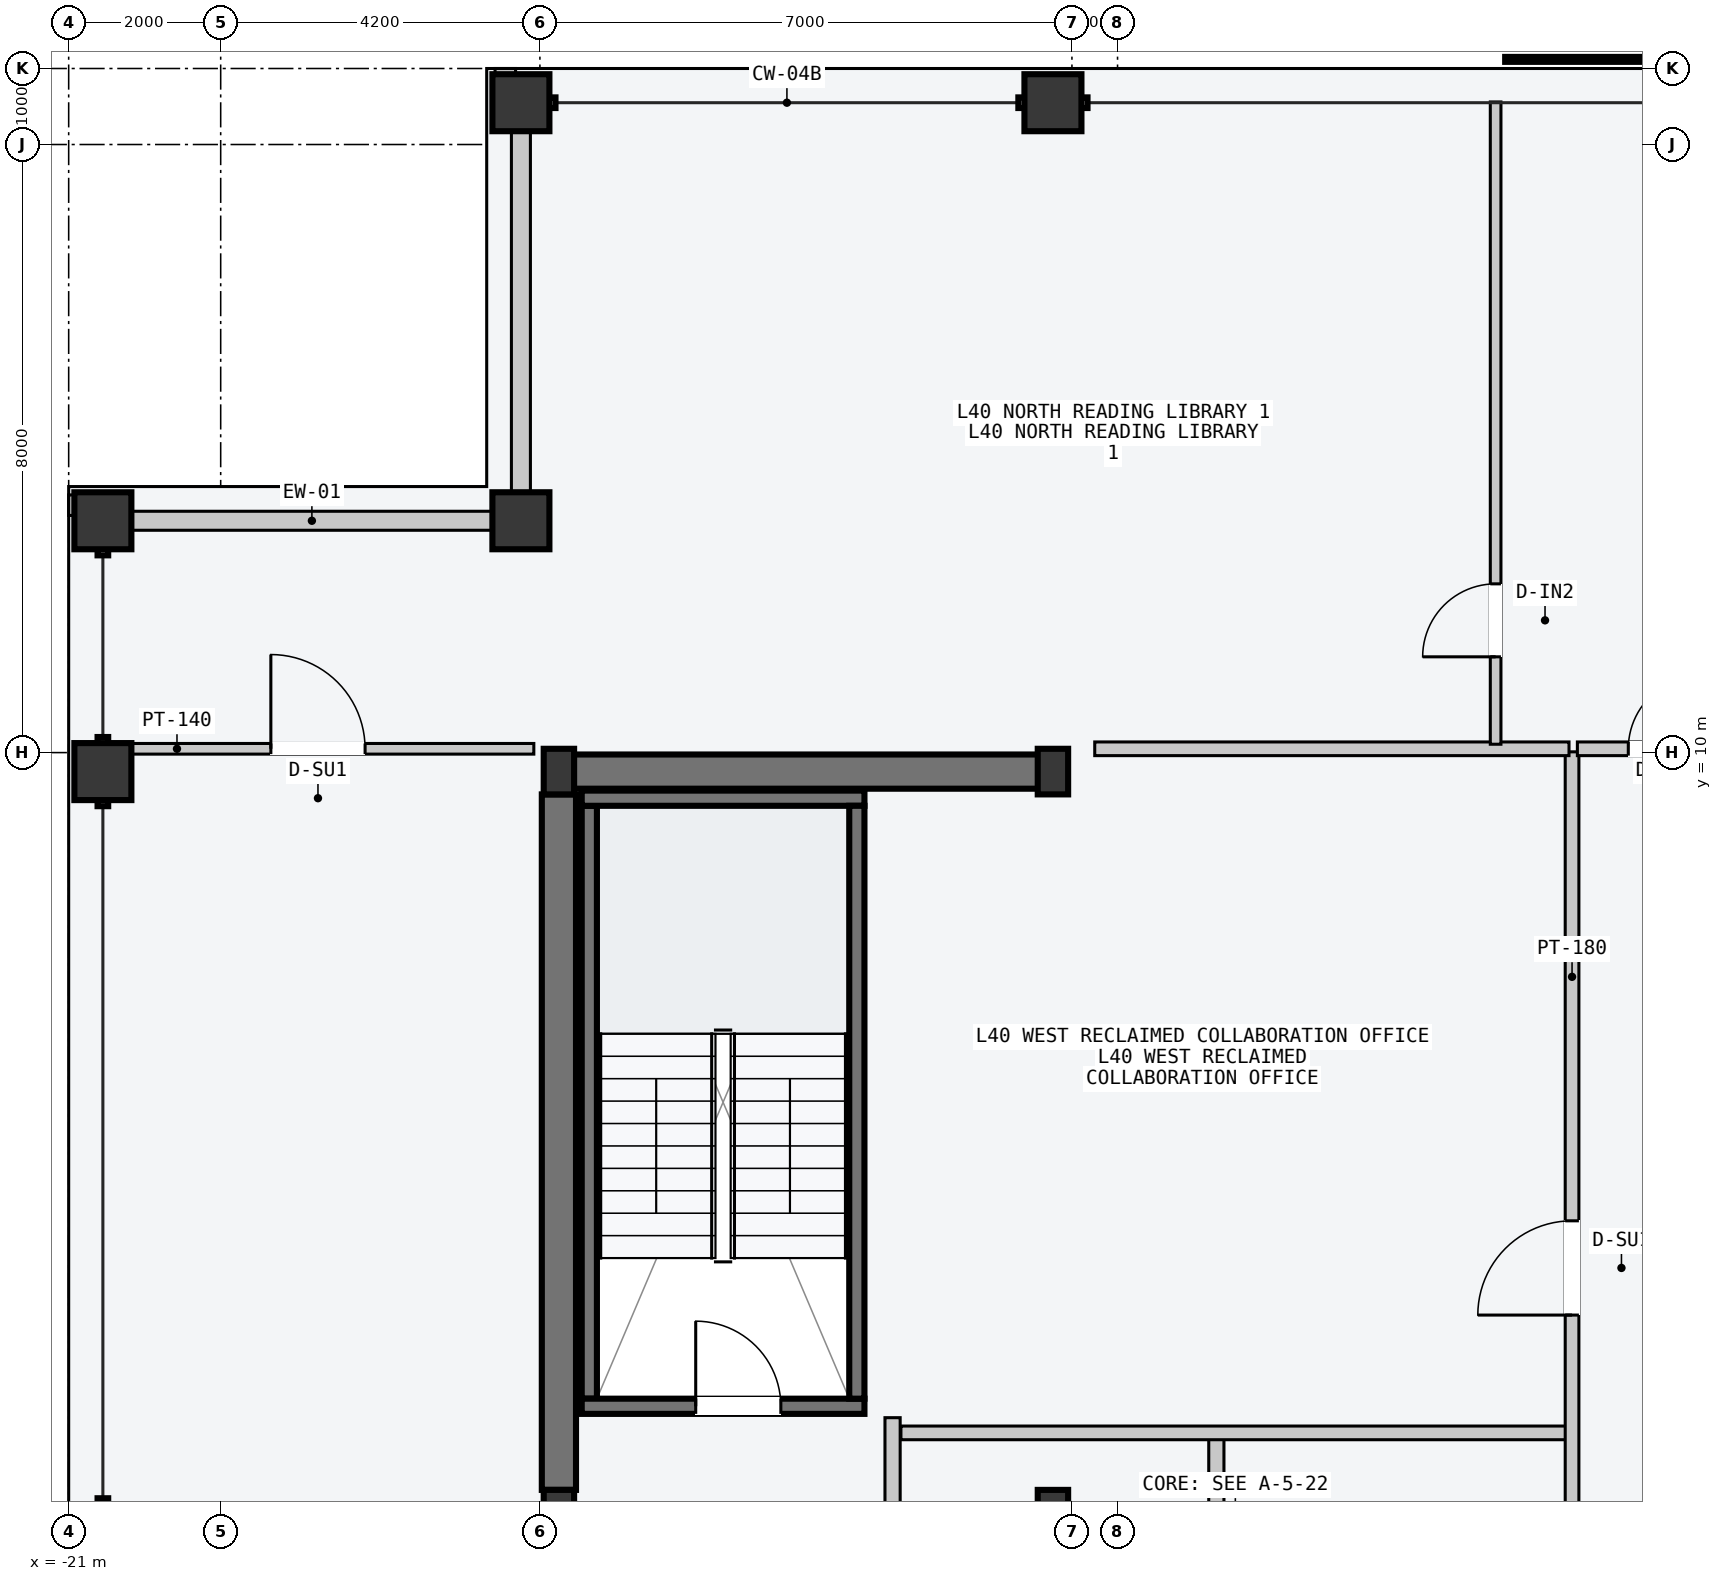
"""IFC4 building model, lengths in metres.
Left out: names, types, materials, properties, quantities, classifications, styles, units other than length and angle.
Written with IfcOpenShell. Run it as: python <this file> out.ifc"""

import sys

from ifc_helpers import new_model, si_unit, direction, frame, frame_2d, origin, origin_2d, place, context, subcontext, project, spatial, rectangle, hollow_rectangle, i_section, extrude, element, fill, save


model = new_model("IFC4")
c1 = context("Model", 3, precision=1e-05, world=origin(), true_north=direction((0.0, 1.0)))
c2 = subcontext(c1, "Body", "Model", "MODEL_VIEW")
j1 = project(units=[si_unit("LENGTHUNIT", "METRE"), si_unit("PLANEANGLEUNIT", "RADIAN")], contexts=[c1])
p1 = place(None, origin())
s1 = spatial("IfcSite", under=j1, at=p1, CompositionType="ELEMENT")
p2 = place(p1, origin())
s2 = spatial("IfcBuilding", under=s1, at=p2, CompositionType="ELEMENT")
p3 = place(p2, frame((0.0, 0.0, 155.1)))
s3 = spatial("IfcBuildingStorey", under=s2, at=p3, CompositionType="ELEMENT", Elevation=155.1)
p4 = place(p3, frame((-14.53, 9.75, -0.2), z_axis=(0.0, 0.0, 1.0), x_axis=(1.0, 0.0, 0.0)))
e1 = element("IfcWall", 1, at=p4, inside=s3, PredefinedType="SHEAR", context=c2, shape_type="SweptSolid", body=[
    extrude(rectangle(XDim=6.46, YDim=0.45, at=frame_2d((3.23, 0.0))), origin(), (0.0, 0.0, 1.0), 3.6),
])
p5 = place(p3, frame((-14.55, 0.3, -0.2), z_axis=(0.0, 0.0, 1.0), x_axis=(0.0, 1.0, 0.0)))
e2 = element("IfcWall", 2, at=p5, inside=s3, PredefinedType="SHEAR", context=c2, shape_type="SweptSolid", body=[
    extrude(rectangle(XDim=9.15, YDim=0.45, at=frame_2d((4.575, 0.0))), origin(), (0.0, 0.0, 1.0), 3.6),
])
p6 = place(p3, frame((-14.15, 1.5, -0.2), z_axis=(0.0, 0.0, 1.0), x_axis=(0.0, 1.0, 0.0)))
e3 = element("IfcWall", 3, at=p6, inside=s3, PredefinedType="SOLIDWALL", context=c2, shape_type="SweptSolid", body=[
    extrude(rectangle(XDim=7.8, YDim=0.2, at=frame_2d((3.9, 0.0))), origin(), (0.0, 0.0, 1.0), 3.6),
])
p7 = place(p3, frame((-14.25, 1.4, -0.2), z_axis=(0.0, 0.0, 1.0), x_axis=(1.0, 0.0, 0.0)))
e4 = element("IfcWall", 4, at=p7, inside=s3, PredefinedType="SOLIDWALL", context=c2, shape_type="SweptSolid", body=[
    extrude(rectangle(XDim=3.72, YDim=0.2, at=frame_2d((1.86, 0.0))), origin(), (0.0, 0.0, 1.0), 3.6),
])
p8 = place(p7, frame((1.5, 0.0, 0.2)))
e5 = element("IfcOpeningElement", 5, at=p8, cuts=e4, PredefinedType="OPENING", context=c2, shape_type="SweptSolid", body=[
    extrude(rectangle(XDim=1.12, YDim=2.18, at=frame_2d((0.56, 1.09))), frame((0.0, 0.11, 0.0), z_axis=(0.0, -1.0, 0.0), x_axis=(1.0, 0.0, 0.0)), (0.0, 0.0, 1.0), 0.22),
])
p9 = place(p3, frame((-14.25, 9.4, -0.2), z_axis=(0.0, 0.0, 1.0), x_axis=(1.0, 0.0, 0.0)))
e6 = element("IfcWall", 6, at=p9, inside=s3, PredefinedType="SOLIDWALL", context=c2, shape_type="SweptSolid", body=[
    extrude(rectangle(XDim=3.72, YDim=0.2, at=frame_2d((1.86, 0.0))), origin(), (0.0, 0.0, 1.0), 3.6),
])
p10 = place(p3, frame((-10.63, 1.5, -0.2), z_axis=(0.0, 0.0, 1.0), x_axis=(0.0, 1.0, 0.0)))
e7 = element("IfcWall", 7, at=p10, inside=s3, PredefinedType="SOLIDWALL", context=c2, shape_type="SweptSolid", body=[
    extrude(rectangle(XDim=7.8, YDim=0.2, at=frame_2d((3.9, 0.0))), origin(), (0.0, 0.0, 1.0), 3.6),
])
for number, where, z_axis, x_axis in (
    (8, (-14.55, 0.0, 0.0), (0.0, 0.0, 1.0), (1.0, 0.0, 0.0)),
    (9, (-14.55, 9.75, 0.0), (0.0, 0.0, 1.0), (1.0, 0.0, 0.0)),
    (10, (-8.05, 0.0, 0.0), (0.0, 0.0, 1.0), (1.0, 0.0, 0.0)),
    (11, (-8.05, 9.75, 0.0), (0.0, 0.0, 1.0), (1.0, 0.0, 0.0)),
):
    element("IfcColumn", number, at=place(p3, frame(where, z_axis=z_axis, x_axis=x_axis)), inside=s3, PredefinedType="COLUMN", context=c2, shape_type="SweptSolid", body=[
        extrude(i_section(OverallWidth=0.4, OverallDepth=0.6, WebThickness=0.022, FlangeThickness=0.036, at=origin_2d()), origin(), (0.0, 0.0, 1.0), 3.6),
    ])
for number, where, z_axis, x_axis in (
    (12, (-15.05, 18.55, 0.0), (0.0, 0.0, 1.0), (1.0, 0.0, 0.0)),
    (13, (-8.05, 18.55, 0.0), (0.0, 0.0, 1.0), (1.0, 0.0, 0.0)),
    (14, (-20.55, 9.75, 0.0), (0.0, 0.0, 1.0), (0.0, 1.0, 0.0)),
    (15, (-20.55, 13.05, 0.0), (0.0, 0.0, 1.0), (0.0, 1.0, 0.0)),
    (16, (-15.05, 13.05, 0.0), (0.0, 0.0, 1.0), (1.0, 0.0, 0.0)),
):
    element("IfcColumn", number, at=place(p3, frame(where, z_axis=z_axis, x_axis=x_axis)), inside=s3, PredefinedType="COLUMN", context=c2, shape_type="SweptSolid", body=[
        extrude(hollow_rectangle(XDim=0.75, YDim=0.75, WallThickness=0.032, at=origin_2d()), origin(), (0.0, 0.0, 1.0), 3.6),
    ])
for number, where, z_axis, x_axis in (
    (17, (-20.165, 13.05, 0.0), (0.0, 0.0, 1.0), (1.0, 0.0, 0.0)),
    (18, (-15.05, 13.435, 0.0), (0.0, 0.0, 1.0), (0.0, 1.0, 0.0)),
):
    element("IfcWall", number, at=place(p3, frame(where, z_axis=z_axis, x_axis=x_axis)), inside=s3, PredefinedType="STANDARD", context=c2, shape_type="SweptSolid", body=[
        extrude(rectangle(XDim=4.73, YDim=0.25, at=frame_2d((2.365, 0.0))), origin(), (0.0, 0.0, 1.0), 1.74),
    ])
for number, where, z_axis, x_axis in (
    (19, (-15.39, 18.89, 0.0), (0.0, 0.0, 1.0), (1.0, 0.0, 0.0)),
    (20, (-20.89, 13.12, 0.0), (0.0, 0.0, 1.0), (0.0, 1.0, 0.0)),
):
    element("IfcWall", number, at=place(p3, frame(where, z_axis=z_axis, x_axis=x_axis)), inside=s3, PredefinedType="PARAPET", context=c2, shape_type="SweptSolid", body=[
        extrude(rectangle(XDim=0.27, YDim=0.22, at=frame_2d((0.135, 0.0))), origin(), (0.0, 0.0, 1.0), 1.2),
    ])
p11 = place(p3, frame((-5.9, -9.45, 0.0), z_axis=(0.0, 0.0, 1.0), x_axis=(0.0, 1.0, 0.0)))
e21 = element("IfcWall", 21, at=p11, inside=s3, PredefinedType="PARTITIONING", context=c2, shape_type="SweptSolid", body=[
    extrude(rectangle(XDim=10.5, YDim=0.2, at=frame_2d((5.25, 0.0))), origin(), (0.0, 0.0, 1.0), 3.4),
])
p12 = place(p11, frame((3.9, 0.0, 0.0)))
e22 = element("IfcOpeningElement", 22, at=p12, cuts=e21, PredefinedType="OPENING", context=c2, shape_type="SweptSolid", body=[
    extrude(rectangle(XDim=1.5, YDim=2.2, at=frame_2d((0.75, 1.1))), frame((0.0, 0.11, 0.0), z_axis=(0.0, -1.0, 0.0), x_axis=(1.0, 0.0, 0.0)), (0.0, 0.0, 1.0), 0.22),
])
p13 = place(p3, frame((-10.16, -2.55, 0.0), z_axis=(0.0, 0.0, 1.0), x_axis=(0.0, 1.0, 0.0)))
e23 = element("IfcWall", 23, at=p13, inside=s3, PredefinedType="PARTITIONING", context=c2, shape_type="SweptSolid", body=[
    extrude(rectangle(XDim=3.8, YDim=0.2, at=frame_2d((1.9, 0.0))), origin(), (0.0, 0.0, 1.0), 3.4),
])
p14 = place(p13, frame((1.3, 0.0, 0.0)))
e24 = element("IfcOpeningElement", 24, at=p14, cuts=e23, PredefinedType="OPENING", context=c2, shape_type="SweptSolid", body=[
    extrude(rectangle(XDim=1.1, YDim=2.15, at=frame_2d((0.55, 1.075))), frame((0.0, 0.11, 0.0), z_axis=(0.0, -1.0, 0.0), x_axis=(1.0, 0.0, 0.0)), (0.0, 0.0, 1.0), 0.22),
])
p15 = place(p3, frame((-10.05, 1.05, 0.0), z_axis=(0.0, 0.0, 1.0), x_axis=(1.0, 0.0, 0.0)))
e25 = element("IfcWall", 25, at=p15, inside=s3, PredefinedType="PARTITIONING", context=c2, shape_type="SweptSolid", body=[
    extrude(rectangle(XDim=8.79, YDim=0.18, at=frame_2d((4.395, 0.0))), origin(), (0.0, 0.0, 1.0), 3.4),
])
p16 = place(p3, frame((-1.22, -3.5, 0.0), z_axis=(0.0, 0.0, 1.0), x_axis=(0.0, 1.0, 0.0)))
e26 = element("IfcWall", 26, at=p16, inside=s3, PredefinedType="PARTITIONING", context=c2, shape_type="SweptSolid", body=[
    extrude(rectangle(XDim=13.51, YDim=0.18, at=frame_2d((6.755, 0.0))), origin(), (0.0, 0.0, 1.0), 3.4),
])
p17 = place(p16, frame((6.1, 0.0, 0.0)))
e27 = element("IfcOpeningElement", 27, at=p17, cuts=e26, PredefinedType="OPENING", context=c2, shape_type="SweptSolid", body=[
    extrude(rectangle(XDim=1.24, YDim=2.24, at=frame_2d((0.62, 1.12))), frame((0.0, 0.1, 0.0), z_axis=(0.0, -1.0, 0.0), x_axis=(1.0, 0.0, 0.0)), (0.0, 0.0, 1.0), 0.2),
])
p18 = place(p16, frame((1.6, 0.0, 0.0)))
e28 = element("IfcOpeningElement", 28, at=p18, cuts=e26, PredefinedType="OPENING", context=c2, shape_type="SweptSolid", body=[
    extrude(rectangle(XDim=0.96, YDim=2.18, at=frame_2d((0.48, 1.09))), frame((0.0, 0.1, 0.0), z_axis=(0.0, -1.0, 0.0), x_axis=(1.0, 0.0, 0.0)), (0.0, 0.0, 1.0), 0.2),
])
p19 = place(p3, frame((-7.5, 10.05, 0.0), z_axis=(0.0, 0.0, 1.0), x_axis=(1.0, 0.0, 0.0)))
e29 = element("IfcWall", 29, at=p19, inside=s3, PredefinedType="PARTITIONING", context=c2, shape_type="SweptSolid", body=[
    extrude(rectangle(XDim=6.24, YDim=0.18, at=frame_2d((3.12, 0.0))), origin(), (0.0, 0.0, 1.0), 3.4),
])
p20 = place(p3, frame((-2.226, 10.11, 0.0), z_axis=(0.0, 0.0, 1.0), x_axis=(0.0, 1.0, 0.0)))
e30 = element("IfcWall", 30, at=p20, inside=s3, PredefinedType="PARTITIONING", context=c2, shape_type="SweptSolid", body=[
    extrude(rectangle(XDim=8.45, YDim=0.14, at=frame_2d((4.225, 0.0))), origin(), (0.0, 0.0, 1.0), 3.4),
])
p21 = place(p20, frame((1.15, 0.0, 0.0)))
e31 = element("IfcOpeningElement", 31, at=p21, cuts=e30, PredefinedType="OPENING", context=c2, shape_type="SweptSolid", body=[
    extrude(rectangle(XDim=0.96, YDim=2.18, at=frame_2d((0.48, 1.09))), frame((0.0, 0.08, 0.0), z_axis=(0.0, -1.0, 0.0), x_axis=(1.0, 0.0, 0.0)), (0.0, 0.0, 1.0), 0.16),
])
p22 = place(p3, frame((-1.15, 10.05, 0.0), z_axis=(0.0, 0.0, 1.0), x_axis=(1.0, 0.0, 0.0)))
e32 = element("IfcWall", 32, at=p22, inside=s3, PredefinedType="PARTITIONING", context=c2, shape_type="SweptSolid", body=[
    extrude(rectangle(XDim=2.3, YDim=0.18, at=frame_2d((1.15, 0.0))), origin(), (0.0, 0.0, 1.0), 3.4),
])
p23 = place(p22, frame((0.67, 0.0, 0.0)))
e33 = element("IfcOpeningElement", 33, at=p23, cuts=e32, PredefinedType="OPENING", context=c2, shape_type="SweptSolid", body=[
    extrude(rectangle(XDim=0.96, YDim=2.18, at=frame_2d((0.48, 1.09))), frame((0.0, 0.1, 0.0), z_axis=(0.0, -1.0, 0.0), x_axis=(1.0, 0.0, 0.0)), (0.0, 0.0, 1.0), 0.2),
])
p24 = place(p3, frame((-20.56, 10.05, 0.0), z_axis=(0.0, 0.0, 1.0), x_axis=(1.0, 0.0, 0.0)))
e34 = element("IfcWall", 34, at=p24, inside=s3, PredefinedType="PARTITIONING", context=c2, shape_type="SweptSolid", body=[
    extrude(rectangle(XDim=5.68, YDim=0.14, at=frame_2d((2.84, 0.0))), origin(), (0.0, 0.0, 1.0), 3.4),
])
p25 = place(p24, frame((2.22, 0.0, 0.0)))
e35 = element("IfcOpeningElement", 35, at=p25, cuts=e34, PredefinedType="OPENING", context=c2, shape_type="SweptSolid", body=[
    extrude(rectangle(XDim=1.24, YDim=2.24, at=frame_2d((0.62, 1.12))), frame((0.0, 0.08, 0.0), z_axis=(0.0, -1.0, 0.0), x_axis=(1.0, 0.0, 0.0)), (0.0, 0.0, 1.0), 0.16),
])
p26 = place(p8, origin())
e36 = element("IfcDoor", 36, at=p26, inside=s3, OperationType="SINGLE_SWING_LEFT", PredefinedType="DOOR", context=c2, shape_type="SweptSolid", body=[
    extrude(rectangle(XDim=1.12, YDim=2.18, at=frame_2d((0.56, 1.09))), frame((0.0, 0.025, 0.0), z_axis=(0.0, -1.0, 0.0), x_axis=(1.0, 0.0, 0.0)), (0.0, 0.0, 1.0), 0.05),
])
fill(e5, e36)
p27 = place(p17, origin())
e37 = element("IfcDoor", 37, at=p27, inside=s3, OperationType="SINGLE_SWING_LEFT", PredefinedType="DOOR", context=c2, shape_type="SweptSolid", body=[
    extrude(rectangle(XDim=1.24, YDim=2.24, at=frame_2d((0.62, 1.12))), frame((0.0, 0.025, 0.0), z_axis=(0.0, -1.0, 0.0), x_axis=(1.0, 0.0, 0.0)), (0.0, 0.0, 1.0), 0.05),
])
fill(e27, e37)
p28 = place(p21, origin())
e38 = element("IfcDoor", 38, at=p28, inside=s3, OperationType="SINGLE_SWING_LEFT", PredefinedType="DOOR", context=c2, shape_type="SweptSolid", body=[
    extrude(rectangle(XDim=0.96, YDim=2.18, at=frame_2d((0.48, 1.09))), frame((0.0, 0.025, 0.0), z_axis=(0.0, -1.0, 0.0), x_axis=(1.0, 0.0, 0.0)), (0.0, 0.0, 1.0), 0.05),
])
fill(e31, e38)
p29 = place(p23, origin())
e39 = element("IfcDoor", 39, at=p29, inside=s3, OperationType="SINGLE_SWING_RIGHT", PredefinedType="DOOR", context=c2, shape_type="SweptSolid", body=[
    extrude(rectangle(XDim=0.96, YDim=2.18, at=frame_2d((0.48, 1.09))), frame((0.0, 0.025, 0.0), z_axis=(0.0, -1.0, 0.0), x_axis=(1.0, 0.0, 0.0)), (0.0, 0.0, 1.0), 0.05),
])
fill(e33, e39)
p30 = place(p25, origin())
e40 = element("IfcDoor", 40, at=p30, inside=s3, OperationType="SINGLE_SWING_LEFT", PredefinedType="DOOR", context=c2, shape_type="SweptSolid", body=[
    extrude(rectangle(XDim=1.24, YDim=2.24, at=frame_2d((0.62, 1.12))), frame((0.0, 0.025, 0.0), z_axis=(0.0, -1.0, 0.0), x_axis=(1.0, 0.0, 0.0)), (0.0, 0.0, 1.0), 0.05),
])
fill(e35, e40)
save(model, sys.argv[1])
